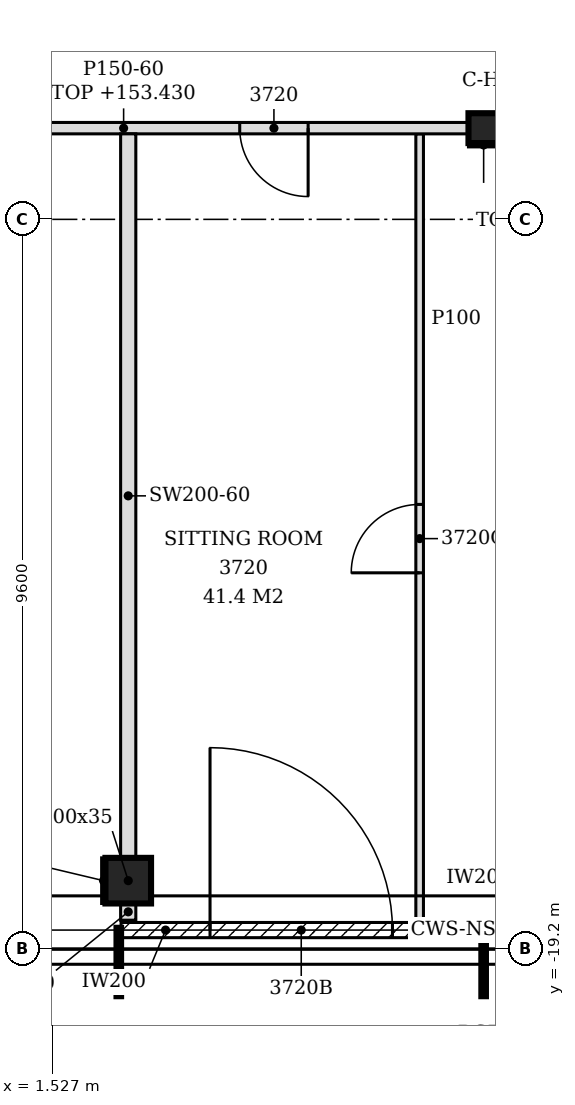
"""IFC4 building model, lengths in metres.
Left out: names, types, materials, properties, quantities, classifications, styles, units other than length and angle.
Written with IfcOpenShell. Run it as: python <this file> out.ifc"""

import sys

from ifc_helpers import new_model, si_unit, direction, frame, frame_2d, origin, origin_2d, place, context, subcontext, project, spatial, polyline, rectangle, hollow_rectangle, i_section, outline, extrude, element, fill, save


model = new_model("IFC4")
c1 = context("Model", 3, precision=1e-05, world=origin(), true_north=direction((0.0, 1.0)))
c2 = subcontext(c1, "Body", "Model", "MODEL_VIEW")
j1 = project(units=[si_unit("LENGTHUNIT", "METRE"), si_unit("PLANEANGLEUNIT", "RADIAN")], contexts=[c1])
p1 = place(None, origin())
s1 = spatial("IfcSite", under=j1, at=p1, CompositionType="ELEMENT")
p2 = place(p1, origin())
s2 = spatial("IfcBuilding", under=s1, at=p2, CompositionType="ELEMENT")
p3 = place(p2, frame((0.0, 0.0, 150.6)))
s3 = spatial("IfcBuildingStorey", under=s2, at=p3, CompositionType="ELEMENT", Elevation=150.6)
p4 = place(p3, frame((2.524, -18.3, -0.15), z_axis=(0.0, 0.0, 1.0), x_axis=(1.0, 0.0, 0.0)))
e1 = element("IfcColumn", 1, at=p4, inside=s3, PredefinedType="COLUMN", context=c2, shape_type="SweptSolid", body=[
    extrude(hollow_rectangle(XDim=0.6, YDim=0.6, WallThickness=0.035, at=origin_2d()), origin(), (0.0, 0.0, 1.0), 3.6),
])
p5 = place(p3, frame((7.2, -8.4, -0.15), z_axis=(0.0, 0.0, 1.0), x_axis=(1.0, 0.0, 0.0)))
e2 = element("IfcColumn", 2, at=p5, inside=s3, PredefinedType="COLUMN", context=c2, shape_type="SweptSolid", body=[
    extrude(i_section(OverallWidth=0.399, OverallDepth=0.393, WebThickness=0.023, FlangeThickness=0.037, FilletRadius=0.015, at=origin_2d()), origin(), (0.0, 0.0, 1.0), 3.6),
])
p6 = place(p3, frame((2.43, -18.95, 0.0), z_axis=(0.0, 0.0, 1.0), x_axis=(1.0, 0.0, 0.0)))
e3 = element("IfcWall", 3, at=p6, inside=s3, PredefinedType="NOTDEFINED", context=c2, shape_type="SweptSolid", body=[
    extrude(rectangle(XDim=4.74, YDim=0.2, at=frame_2d((2.37, 0.0))), origin(), (0.0, 0.0, 1.0), 3.45),
])
p7 = place(p6, frame((1.17, 0.0, 0.0)))
e4 = element("IfcOpeningElement", 4, at=p7, cuts=e3, PredefinedType="OPENING", context=c2, shape_type="SweptSolid", body=[
    extrude(rectangle(XDim=2.4, YDim=2.4, at=frame_2d((1.2, 1.2))), frame((0.0, 0.11, 0.0), z_axis=(0.0, -1.0, 0.0), x_axis=(1.0, 0.0, 0.0)), (0.0, 0.0, 1.0), 0.22),
])
p8 = place(p3, frame((7.23, -18.95, 0.0), z_axis=(0.0, 0.0, 1.0), x_axis=(1.0, 0.0, 0.0)))
e5 = element("IfcWall", 5, at=p8, inside=s3, PredefinedType="NOTDEFINED", context=c2, shape_type="SweptSolid", body=[
    extrude(rectangle(XDim=4.74, YDim=0.2, at=frame_2d((2.37, 0.0))), origin(), (0.0, 0.0, 1.0), 3.45),
])
p9 = place(p8, frame((1.17, 0.0, 0.0)))
e6 = element("IfcOpeningElement", 6, at=p9, cuts=e5, PredefinedType="OPENING", context=c2, shape_type="SweptSolid", body=[
    extrude(rectangle(XDim=2.4, YDim=2.4, at=frame_2d((1.2, 1.2))), frame((0.0, 0.11, 0.0), z_axis=(0.0, -1.0, 0.0), x_axis=(1.0, 0.0, 0.0)), (0.0, 0.0, 1.0), 0.22),
])
p10 = place(p3, frame((2.524, -18.82, 0.0), z_axis=(0.0, 0.0, 1.0), x_axis=(0.0, 1.0, 0.0)))
e7 = element("IfcWall", 7, at=p10, inside=s3, PredefinedType="PARTITIONING", context=c2, shape_type="SweptSolid", body=[
    extrude(rectangle(XDim=0.22, YDim=0.2, at=frame_2d((0.11, 0.0))), origin(), (0.0, 0.0, 1.0), 3.45),
])
p11 = place(p3, frame((6.358, -18.82, 0.0), z_axis=(0.0, 0.0, 1.0), x_axis=(0.0, 1.0, 0.0)))
e8 = element("IfcWall", 8, at=p11, inside=s3, PredefinedType="PARTITIONING", context=c2, shape_type="SweptSolid", body=[
    extrude(outline(polyline([(0.0, 0.0), (10.345, 0.0), (10.345, 2.83), (10.27, 2.83), (10.268, 3.45), (4.525, 3.45), (4.523, 2.88), (4.315, 2.88), (4.313, 3.45), (0.67, 3.45), (0.668, 2.93), (0.37, 2.93), (0.368, 3.45), (0.0, 3.45), (0.0, 0.0)])), frame((0.0, 0.05, 0.0), z_axis=(0.0, -1.0, 0.0), x_axis=(1.0, 0.0, 0.0)), (0.0, 0.0, 1.0), 0.1),
])
p12 = place(p11, frame((4.57, 0.0, 0.0)))
e9 = element("IfcOpeningElement", 9, at=p12, cuts=e8, PredefinedType="OPENING", context=c2, shape_type="SweptSolid", body=[
    extrude(rectangle(XDim=0.9, YDim=2.1, at=frame_2d((0.45, 1.05))), frame((0.0, 0.06, 0.0), z_axis=(0.0, -1.0, 0.0), x_axis=(1.0, 0.0, 0.0)), (0.0, 0.0, 1.0), 0.12),
])
p13 = place(p3, frame((2.524, -18.0, 0.0), z_axis=(0.0, 0.0, 1.0), x_axis=(0.0, 1.0, 0.0)))
e10 = element("IfcWall", 10, at=p13, inside=s3, PredefinedType="PARTITIONING", context=c2, shape_type="SweptSolid", body=[
    extrude(outline(polyline([(0.0, 0.0), (9.525, 0.0), (9.525, 2.83), (9.45, 2.83), (9.448, 3.45), (3.705, 3.45), (3.703, 2.88), (3.495, 2.88), (3.493, 3.45), (0.0, 3.45), (0.0, 0.0)])), frame((0.0, 0.1, 0.0), z_axis=(0.0, -1.0, 0.0), x_axis=(1.0, 0.0, 0.0)), (0.0, 0.0, 1.0), 0.2),
])
p14 = place(p3, frame((-4.601, -8.4, 0.0), z_axis=(0.0, 0.0, 1.0), x_axis=(1.0, 0.0, 0.0)))
e11 = element("IfcWall", 11, at=p14, inside=s3, PredefinedType="PARTITIONING", context=c2, shape_type="SweptSolid", body=[
    extrude(rectangle(XDim=11.601, YDim=0.15, at=frame_2d((5.801, 0.0))), origin(), (0.0, 0.0, 1.0), 2.83),
])
p15 = place(p14, frame((0.974, 0.0, 0.0)))
e12 = element("IfcOpeningElement", 12, at=p15, cuts=e11, PredefinedType="OPENING", context=c2, shape_type="SweptSolid", body=[
    extrude(rectangle(XDim=0.9, YDim=2.1, at=frame_2d((0.45, 1.05))), frame((0.0, 0.085, 0.0), z_axis=(0.0, -1.0, 0.0), x_axis=(1.0, 0.0, 0.0)), (0.0, 0.0, 1.0), 0.17),
])
p16 = place(p14, frame((4.636, 0.0, 0.0)))
e13 = element("IfcOpeningElement", 13, at=p16, cuts=e11, PredefinedType="OPENING", context=c2, shape_type="SweptSolid", body=[
    extrude(rectangle(XDim=0.9, YDim=2.1, at=frame_2d((0.45, 1.05))), frame((0.0, 0.085, 0.0), z_axis=(0.0, -1.0, 0.0), x_axis=(1.0, 0.0, 0.0)), (0.0, 0.0, 1.0), 0.17),
])
p17 = place(p14, frame((8.592, 0.0, 0.0)))
e14 = element("IfcOpeningElement", 14, at=p17, cuts=e11, PredefinedType="OPENING", context=c2, shape_type="SweptSolid", body=[
    extrude(rectangle(XDim=0.9, YDim=2.1, at=frame_2d((0.45, 1.05))), frame((0.0, 0.085, 0.0), z_axis=(0.0, -1.0, 0.0), x_axis=(1.0, 0.0, 0.0)), (0.0, 0.0, 1.0), 0.17),
])
p18 = place(p3, frame((2.199, -18.6, 0.0), z_axis=(0.0, 0.0, 1.0), x_axis=(0.0, 1.0, 0.0)))
e15 = element("IfcWall", 15, at=p18, inside=s3, PredefinedType="PARTITIONING", context=c2, shape_type="SweptSolid", body=[
    extrude(rectangle(XDim=0.6, YDim=0.05, at=frame_2d((0.3, 0.0))), origin(), (0.0, 0.0, 1.0), 2.93),
])
p19 = place(p3, frame((7.0, -8.622, 0.0), z_axis=(0.0, 0.0, 1.0), x_axis=(1.0, 0.0, 0.0)))
e16 = element("IfcWall", 16, at=p19, inside=s3, PredefinedType="PARTITIONING", context=c2, shape_type="SweptSolid", body=[
    extrude(rectangle(XDim=0.399, YDim=0.05, at=frame_2d((0.199, 0.0))), origin(), (0.0, 0.0, 1.0), 2.93),
])
p20 = place(p7, origin())
e17 = element("IfcDoor", 17, at=p20, inside=s3, OperationType="SINGLE_SWING_LEFT", PredefinedType="DOOR", context=c2, shape_type="SweptSolid", body=[
    extrude(rectangle(XDim=2.4, YDim=2.4, at=frame_2d((1.2, 1.2))), frame((0.0, 0.025, 0.0), z_axis=(0.0, -1.0, 0.0), x_axis=(1.0, 0.0, 0.0)), (0.0, 0.0, 1.0), 0.05),
])
fill(e4, e17)
p21 = place(p17, frame((0.9, 0.0, 0.0), z_axis=(0.0, 0.0, 1.0), x_axis=(-1.0, 0.0, 0.0)))
e18 = element("IfcDoor", 18, at=p21, inside=s3, OperationType="SINGLE_SWING_LEFT", PredefinedType="DOOR", context=c2, shape_type="SweptSolid", body=[
    extrude(rectangle(XDim=0.9, YDim=2.1, at=frame_2d((0.45, 1.05))), frame((0.0, 0.025, 0.0), z_axis=(0.0, -1.0, 0.0), x_axis=(1.0, 0.0, 0.0)), (0.0, 0.0, 1.0), 0.05),
])
fill(e14, e18)
p22 = place(p12, origin())
e19 = element("IfcDoor", 19, at=p22, inside=s3, OperationType="SINGLE_SWING_LEFT", PredefinedType="DOOR", context=c2, shape_type="SweptSolid", body=[
    extrude(rectangle(XDim=0.9, YDim=2.1, at=frame_2d((0.45, 1.05))), frame((0.0, 0.025, 0.0), z_axis=(0.0, -1.0, 0.0), x_axis=(1.0, 0.0, 0.0)), (0.0, 0.0, 1.0), 0.05),
])
fill(e9, e19)
save(model, sys.argv[1])
